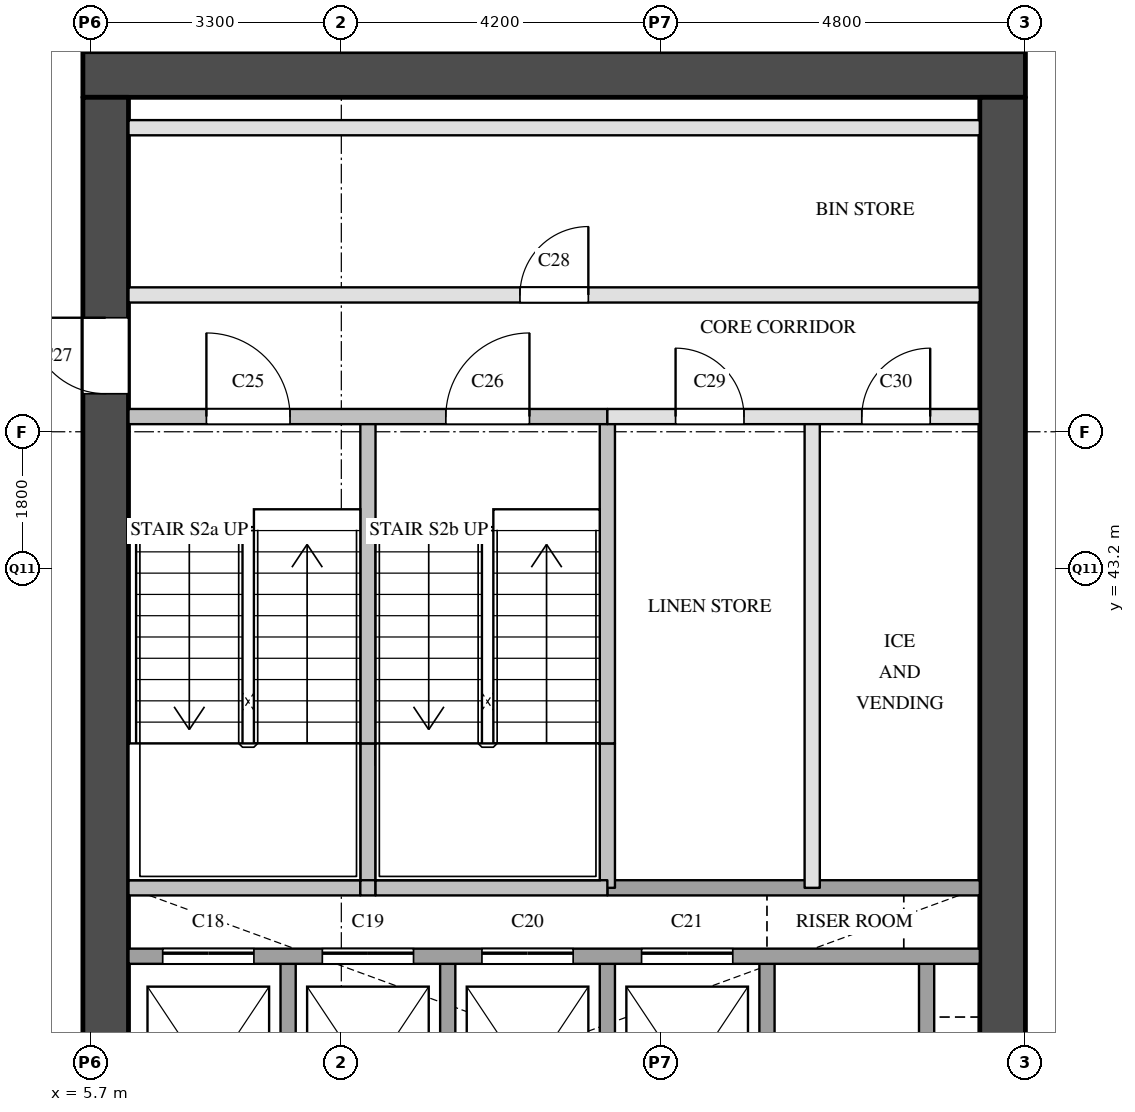
"""IFC4 building model, lengths in metres.
Left out: names, types, materials, properties, quantities, classifications, styles, units other than length and angle.
Written with IfcOpenShell. Run it as: python <this file> out.ifc"""

import sys

from ifc_helpers import new_model, si_unit, direction, frame, frame_2d, origin, place, context, subcontext, project, spatial, rectangle, extrude, element, fill, save


model = new_model("IFC4")
c1 = context("Model", 3, precision=1e-05, world=origin(), true_north=direction((0.0, 1.0)))
c2 = subcontext(c1, "Body", "Model", "MODEL_VIEW")
j1 = project(units=[si_unit("LENGTHUNIT", "METRE"), si_unit("PLANEANGLEUNIT", "RADIAN")], contexts=[c1])
p1 = place(None, origin())
s1 = spatial("IfcSite", under=j1, at=p1, CompositionType="ELEMENT")
p2 = place(p1, origin())
s2 = spatial("IfcBuilding", under=s1, at=p2, CompositionType="ELEMENT")
p3 = place(p2, frame((0.0, 0.0, 53.8)))
s3 = spatial("IfcBuildingStorey", under=s2, at=p3, CompositionType="ELEMENT", Elevation=53.8)
p4 = place(p3, frame((5.6, 49.7, 0.0), z_axis=(0.0, 0.0, 1.0), x_axis=(1.0, 0.0, 0.0)))
e1 = element("IfcWall", 1, at=p4, inside=s3, PredefinedType="SHEAR", context=c2, shape_type="SweptSolid", body=[
    extrude(rectangle(XDim=12.4, YDim=0.6, at=frame_2d((6.2, 0.0))), origin(), (0.0, 0.0, 1.0), 3.5),
])
p5 = place(p3, frame((5.9, 29.1, 0.0), z_axis=(0.0, 0.0, 1.0), x_axis=(0.0, 1.0, 0.0)))
e2 = element("IfcWall", 2, at=p5, inside=s3, PredefinedType="SHEAR", context=c2, shape_type="SweptSolid", body=[
    extrude(rectangle(XDim=20.3, YDim=0.6, at=frame_2d((10.15, 0.0))), origin(), (0.0, 0.0, 1.0), 3.5),
])
p6 = place(p5, frame((3.6, 0.0, 0.0)))
e3 = element("IfcOpeningElement", 3, at=p6, cuts=e2, PredefinedType="OPENING", context=c2, shape_type="SweptSolid", body=[
    extrude(rectangle(XDim=1.8, YDim=2.1, at=frame_2d((0.9, 1.05))), frame((0.0, 0.31, 0.0), z_axis=(0.0, -1.0, 0.0), x_axis=(1.0, 0.0, 0.0)), (0.0, 0.0, 1.0), 0.62),
])
p7 = place(p5, frame((16.4, 0.0, 0.0)))
e4 = element("IfcOpeningElement", 4, at=p7, cuts=e2, PredefinedType="OPENING", context=c2, shape_type="SweptSolid", body=[
    extrude(rectangle(XDim=1.0, YDim=2.1, at=frame_2d((0.5, 1.05))), frame((0.0, 0.31, 0.0), z_axis=(0.0, -1.0, 0.0), x_axis=(1.0, 0.0, 0.0)), (0.0, 0.0, 1.0), 0.62),
])
p8 = place(p3, frame((17.7, 29.1, 0.0), z_axis=(0.0, 0.0, 1.0), x_axis=(0.0, 1.0, 0.0)))
e5 = element("IfcWall", 5, at=p8, inside=s3, PredefinedType="SHEAR", context=c2, shape_type="SweptSolid", body=[
    extrude(rectangle(XDim=20.3, YDim=0.6, at=frame_2d((10.15, 0.0))), origin(), (0.0, 0.0, 1.0), 3.5),
])
p9 = place(p8, frame((1.25, 0.0, 0.0)))
e6 = element("IfcOpeningElement", 6, at=p9, cuts=e5, PredefinedType="OPENING", context=c2, shape_type="SweptSolid", body=[
    extrude(rectangle(XDim=0.7, YDim=2.1, at=frame_2d((0.35, 1.05))), frame((0.0, 0.31, 0.0), z_axis=(0.0, -1.0, 0.0), x_axis=(1.0, 0.0, 0.0)), (0.0, 0.0, 1.0), 0.62),
])
p10 = place(p8, frame((7.05, 0.0, 0.0)))
e7 = element("IfcOpeningElement", 7, at=p10, cuts=e5, PredefinedType="OPENING", context=c2, shape_type="SweptSolid", body=[
    extrude(rectangle(XDim=0.7, YDim=2.1, at=frame_2d((0.35, 1.05))), frame((0.0, 0.31, 0.0), z_axis=(0.0, -1.0, 0.0), x_axis=(1.0, 0.0, 0.0)), (0.0, 0.0, 1.0), 0.62),
])
p11 = place(p3, frame((8.3, 34.9, 0.0), z_axis=(0.0, 0.0, 1.0), x_axis=(0.0, 1.0, 0.0)))
e8 = element("IfcWall", 8, at=p11, inside=s3, PredefinedType="SOLIDWALL", context=c2, shape_type="SweptSolid", body=[
    extrude(rectangle(XDim=3.2, YDim=0.2, at=frame_2d((1.6, 0.0))), origin(), (0.0, 0.0, 1.0), 3.5),
])
p12 = place(p3, frame((9.35, 39.0, 0.0), z_axis=(0.0, 0.0, 1.0), x_axis=(0.0, 1.0, 0.0)))
e9 = element("IfcWall", 9, at=p12, inside=s3, PredefinedType="SOLIDWALL", context=c2, shape_type="SweptSolid", body=[
    extrude(rectangle(XDim=1.9, YDim=0.2, at=frame_2d((0.95, 0.0))), origin(), (0.0, 0.0, 1.0), 3.5),
])
p13 = place(p3, frame((9.35, 40.9, 0.0), z_axis=(0.0, 0.0, 1.0), x_axis=(0.0, 1.0, 0.0)))
e10 = element("IfcWall", 10, at=p13, inside=s3, PredefinedType="SOLIDWALL", context=c2, shape_type="SweptSolid", body=[
    extrude(rectangle(XDim=4.3, YDim=0.2, at=frame_2d((2.15, 0.0))), origin(), (0.0, 0.0, 1.0), 3.5),
])
for number, where, z_axis, x_axis in (
    (11, (10.4, 34.9, 0.0), (0.0, 0.0, 1.0), (0.0, 1.0, 0.0)),
    (12, (12.5, 34.9, 0.0), (0.0, 0.0, 1.0), (0.0, 1.0, 0.0)),
):
    element("IfcWall", number, at=place(p3, frame(where, z_axis=z_axis, x_axis=x_axis)), inside=s3, PredefinedType="SOLIDWALL", context=c2, shape_type="SweptSolid", body=[
        extrude(rectangle(XDim=3.2, YDim=0.2, at=frame_2d((1.6, 0.0))), origin(), (0.0, 0.0, 1.0), 3.5),
    ])
p14 = place(p3, frame((12.5, 39.0, 0.0), z_axis=(0.0, 0.0, 1.0), x_axis=(0.0, 1.0, 0.0)))
e13 = element("IfcWall", 13, at=p14, inside=s3, PredefinedType="SOLIDWALL", context=c2, shape_type="SweptSolid", body=[
    extrude(rectangle(XDim=1.9, YDim=0.2, at=frame_2d((0.95, 0.0))), origin(), (0.0, 0.0, 1.0), 3.5),
])
p15 = place(p3, frame((12.5, 40.9, 0.0), z_axis=(0.0, 0.0, 1.0), x_axis=(0.0, 1.0, 0.0)))
e14 = element("IfcWall", 14, at=p15, inside=s3, PredefinedType="SOLIDWALL", context=c2, shape_type="SweptSolid", body=[
    extrude(rectangle(XDim=4.3, YDim=0.2, at=frame_2d((2.15, 0.0))), origin(), (0.0, 0.0, 1.0), 3.5),
])
p16 = place(p3, frame((14.6, 34.9, 0.0), z_axis=(0.0, 0.0, 1.0), x_axis=(0.0, 1.0, 0.0)))
e15 = element("IfcWall", 15, at=p16, inside=s3, PredefinedType="SOLIDWALL", context=c2, shape_type="SweptSolid", body=[
    extrude(rectangle(XDim=3.2, YDim=0.2, at=frame_2d((1.6, 0.0))), origin(), (0.0, 0.0, 1.0), 3.5),
])
p17 = place(p3, frame((15.195, 39.0, 0.0), z_axis=(0.0, 0.0, 1.0), x_axis=(0.0, 1.0, 0.0)))
e16 = element("IfcWall", 16, at=p17, inside=s3, PredefinedType="PARTITIONING", context=c2, shape_type="SweptSolid", body=[
    extrude(rectangle(XDim=6.2, YDim=0.2, at=frame_2d((3.1, 0.0))), origin(), (0.0, 0.0, 1.0), 3.5),
])
p18 = place(p3, frame((16.7, 34.9, 0.0), z_axis=(0.0, 0.0, 1.0), x_axis=(0.0, 1.0, 0.0)))
e17 = element("IfcWall", 17, at=p18, inside=s3, PredefinedType="SOLIDWALL", context=c2, shape_type="SweptSolid", body=[
    extrude(rectangle(XDim=3.2, YDim=0.2, at=frame_2d((1.6, 0.0))), origin(), (0.0, 0.0, 1.0), 3.5),
])
p19 = place(p3, frame((6.2, 38.1, 0.0), z_axis=(0.0, 0.0, 1.0), x_axis=(1.0, 0.0, 0.0)))
e18 = element("IfcWall", 18, at=p19, inside=s3, PredefinedType="SOLIDWALL", context=c2, shape_type="SweptSolid", body=[
    extrude(rectangle(XDim=11.2, YDim=0.2, at=frame_2d((5.6, 0.0))), origin(), (0.0, 0.0, 1.0), 3.5),
])
p20 = place(p19, frame((0.45, 0.0, 0.0)))
e19 = element("IfcOpeningElement", 19, at=p20, cuts=e18, PredefinedType="OPENING", context=c2, shape_type="SweptSolid", body=[
    extrude(rectangle(XDim=1.2, YDim=2.1, at=frame_2d((0.6, 1.05))), frame((0.0, 0.11, 0.0), z_axis=(0.0, -1.0, 0.0), x_axis=(1.0, 0.0, 0.0)), (0.0, 0.0, 1.0), 0.22),
])
p21 = place(p19, frame((2.55, 0.0, 0.0)))
e20 = element("IfcOpeningElement", 20, at=p21, cuts=e18, PredefinedType="OPENING", context=c2, shape_type="SweptSolid", body=[
    extrude(rectangle(XDim=1.2, YDim=2.1, at=frame_2d((0.6, 1.05))), frame((0.0, 0.11, 0.0), z_axis=(0.0, -1.0, 0.0), x_axis=(1.0, 0.0, 0.0)), (0.0, 0.0, 1.0), 0.22),
])
p22 = place(p19, frame((4.65, 0.0, 0.0)))
e21 = element("IfcOpeningElement", 21, at=p22, cuts=e18, PredefinedType="OPENING", context=c2, shape_type="SweptSolid", body=[
    extrude(rectangle(XDim=1.2, YDim=2.1, at=frame_2d((0.6, 1.05))), frame((0.0, 0.11, 0.0), z_axis=(0.0, -1.0, 0.0), x_axis=(1.0, 0.0, 0.0)), (0.0, 0.0, 1.0), 0.22),
])
p23 = place(p19, frame((6.75, 0.0, 0.0)))
e22 = element("IfcOpeningElement", 22, at=p23, cuts=e18, PredefinedType="OPENING", context=c2, shape_type="SweptSolid", body=[
    extrude(rectangle(XDim=1.2, YDim=2.1, at=frame_2d((0.6, 1.05))), frame((0.0, 0.11, 0.0), z_axis=(0.0, -1.0, 0.0), x_axis=(1.0, 0.0, 0.0)), (0.0, 0.0, 1.0), 0.22),
])
p24 = place(p3, frame((12.5, 39.0, 0.0), z_axis=(0.0, 0.0, 1.0), x_axis=(1.0, 0.0, 0.0)))
e23 = element("IfcWall", 23, at=p24, inside=s3, PredefinedType="SOLIDWALL", context=c2, shape_type="SweptSolid", body=[
    extrude(rectangle(XDim=4.9, YDim=0.2, at=frame_2d((2.45, 0.0))), origin(), (0.0, 0.0, 1.0), 3.5),
])
p25 = place(p3, frame((6.2, 39.0, 0.0), z_axis=(0.0, 0.0, 1.0), x_axis=(1.0, 0.0, 0.0)))
e24 = element("IfcWall", 24, at=p25, inside=s3, PredefinedType="SOLIDWALL", context=c2, shape_type="SweptSolid", body=[
    extrude(rectangle(XDim=3.05, YDim=0.2, at=frame_2d((1.525, 0.0))), origin(), (0.0, 0.0, 1.0), 3.5),
])
p26 = place(p3, frame((9.25, 39.0, 0.0), z_axis=(0.0, 0.0, 1.0), x_axis=(1.0, 0.0, 0.0)))
e25 = element("IfcWall", 25, at=p26, inside=s3, PredefinedType="SOLIDWALL", context=c2, shape_type="SweptSolid", body=[
    extrude(rectangle(XDim=0.2, YDim=0.2, at=frame_2d((0.1, 0.0))), origin(), (0.0, 0.0, 1.0), 3.5),
])
p27 = place(p3, frame((9.45, 39.0, 0.0), z_axis=(0.0, 0.0, 1.0), x_axis=(1.0, 0.0, 0.0)))
e26 = element("IfcWall", 26, at=p27, inside=s3, PredefinedType="SOLIDWALL", context=c2, shape_type="SweptSolid", body=[
    extrude(rectangle(XDim=3.05, YDim=0.2, at=frame_2d((1.525, 0.0))), origin(), (0.0, 0.0, 1.0), 3.5),
])
p28 = place(p3, frame((12.5, 45.2, 0.0), z_axis=(0.0, 0.0, 1.0), x_axis=(1.0, 0.0, 0.0)))
e27 = element("IfcWall", 27, at=p28, inside=s3, PredefinedType="PARTITIONING", context=c2, shape_type="SweptSolid", body=[
    extrude(rectangle(XDim=4.9, YDim=0.2, at=frame_2d((2.45, 0.0))), origin(), (0.0, 0.0, 1.0), 3.5),
])
p29 = place(p28, frame((0.897, 0.0, 0.0)))
e28 = element("IfcOpeningElement", 28, at=p29, cuts=e27, PredefinedType="OPENING", context=c2, shape_type="SweptSolid", body=[
    extrude(rectangle(XDim=0.9, YDim=2.1, at=frame_2d((0.45, 1.05))), frame((0.0, 0.11, 0.0), z_axis=(0.0, -1.0, 0.0), x_axis=(1.0, 0.0, 0.0)), (0.0, 0.0, 1.0), 0.22),
])
p30 = place(p28, frame((3.347, 0.0, 0.0)))
e29 = element("IfcOpeningElement", 29, at=p30, cuts=e27, PredefinedType="OPENING", context=c2, shape_type="SweptSolid", body=[
    extrude(rectangle(XDim=0.9, YDim=2.1, at=frame_2d((0.45, 1.05))), frame((0.0, 0.11, 0.0), z_axis=(0.0, -1.0, 0.0), x_axis=(1.0, 0.0, 0.0)), (0.0, 0.0, 1.0), 0.22),
])
p31 = place(p3, frame((6.2, 45.2, 0.0), z_axis=(0.0, 0.0, 1.0), x_axis=(1.0, 0.0, 0.0)))
e30 = element("IfcWall", 30, at=p31, inside=s3, PredefinedType="SOLIDWALL", context=c2, shape_type="SweptSolid", body=[
    extrude(rectangle(XDim=6.3, YDim=0.2, at=frame_2d((3.15, 0.0))), origin(), (0.0, 0.0, 1.0), 3.5),
])
p32 = place(p31, frame((1.025, 0.0, 0.0)))
e31 = element("IfcOpeningElement", 31, at=p32, cuts=e30, PredefinedType="OPENING", context=c2, shape_type="SweptSolid", body=[
    extrude(rectangle(XDim=1.1, YDim=2.1, at=frame_2d((0.55, 1.05))), frame((0.0, 0.11, 0.0), z_axis=(0.0, -1.0, 0.0), x_axis=(1.0, 0.0, 0.0)), (0.0, 0.0, 1.0), 0.22),
])
p33 = place(p31, frame((4.175, 0.0, 0.0)))
e32 = element("IfcOpeningElement", 32, at=p33, cuts=e30, PredefinedType="OPENING", context=c2, shape_type="SweptSolid", body=[
    extrude(rectangle(XDim=1.1, YDim=2.1, at=frame_2d((0.55, 1.05))), frame((0.0, 0.11, 0.0), z_axis=(0.0, -1.0, 0.0), x_axis=(1.0, 0.0, 0.0)), (0.0, 0.0, 1.0), 0.22),
])
p34 = place(p3, frame((6.2, 46.8, 0.0), z_axis=(0.0, 0.0, 1.0), x_axis=(1.0, 0.0, 0.0)))
e33 = element("IfcWall", 33, at=p34, inside=s3, PredefinedType="PARTITIONING", context=c2, shape_type="SweptSolid", body=[
    extrude(rectangle(XDim=11.2, YDim=0.2, at=frame_2d((5.6, 0.0))), origin(), (0.0, 0.0, 1.0), 3.5),
])
p35 = place(p34, frame((5.15, 0.0, 0.0)))
e34 = element("IfcOpeningElement", 34, at=p35, cuts=e33, PredefinedType="OPENING", context=c2, shape_type="SweptSolid", body=[
    extrude(rectangle(XDim=0.9, YDim=2.1, at=frame_2d((0.45, 1.05))), frame((0.0, 0.11, 0.0), z_axis=(0.0, -1.0, 0.0), x_axis=(1.0, 0.0, 0.0)), (0.0, 0.0, 1.0), 0.22),
])
p36 = place(p3, frame((6.2, 49.0, 0.0), z_axis=(0.0, 0.0, 1.0), x_axis=(1.0, 0.0, 0.0)))
e35 = element("IfcWall", 35, at=p36, inside=s3, PredefinedType="PARTITIONING", context=c2, shape_type="SweptSolid", body=[
    extrude(rectangle(XDim=11.2, YDim=0.2, at=frame_2d((5.6, 0.0))), origin(), (0.0, 0.0, 1.0), 3.5),
])
p37 = place(p20, origin())
e36 = element("IfcDoor", 36, at=p37, inside=s3, OperationType="SLIDING_TO_LEFT", PredefinedType="DOOR", context=c2, shape_type="SweptSolid", body=[
    extrude(rectangle(XDim=1.2, YDim=2.1, at=frame_2d((0.6, 1.05))), frame((0.0, 0.025, 0.0), z_axis=(0.0, -1.0, 0.0), x_axis=(1.0, 0.0, 0.0)), (0.0, 0.0, 1.0), 0.05),
])
fill(e19, e36)
p38 = place(p21, origin())
e37 = element("IfcDoor", 37, at=p38, inside=s3, OperationType="SLIDING_TO_LEFT", PredefinedType="DOOR", context=c2, shape_type="SweptSolid", body=[
    extrude(rectangle(XDim=1.2, YDim=2.1, at=frame_2d((0.6, 1.05))), frame((0.0, 0.025, 0.0), z_axis=(0.0, -1.0, 0.0), x_axis=(1.0, 0.0, 0.0)), (0.0, 0.0, 1.0), 0.05),
])
fill(e20, e37)
p39 = place(p22, origin())
e38 = element("IfcDoor", 38, at=p39, inside=s3, OperationType="SLIDING_TO_LEFT", PredefinedType="DOOR", context=c2, shape_type="SweptSolid", body=[
    extrude(rectangle(XDim=1.2, YDim=2.1, at=frame_2d((0.6, 1.05))), frame((0.0, 0.025, 0.0), z_axis=(0.0, -1.0, 0.0), x_axis=(1.0, 0.0, 0.0)), (0.0, 0.0, 1.0), 0.05),
])
fill(e21, e38)
p40 = place(p23, origin())
e39 = element("IfcDoor", 39, at=p40, inside=s3, OperationType="SLIDING_TO_LEFT", PredefinedType="DOOR", context=c2, shape_type="SweptSolid", body=[
    extrude(rectangle(XDim=1.2, YDim=2.1, at=frame_2d((0.6, 1.05))), frame((0.0, 0.025, 0.0), z_axis=(0.0, -1.0, 0.0), x_axis=(1.0, 0.0, 0.0)), (0.0, 0.0, 1.0), 0.05),
])
fill(e22, e39)
p41 = place(p32, origin())
e40 = element("IfcDoor", 40, at=p41, inside=s3, OperationType="SINGLE_SWING_LEFT", PredefinedType="DOOR", context=c2, shape_type="SweptSolid", body=[
    extrude(rectangle(XDim=1.1, YDim=2.1, at=frame_2d((0.55, 1.05))), frame((0.0, 0.025, 0.0), z_axis=(0.0, -1.0, 0.0), x_axis=(1.0, 0.0, 0.0)), (0.0, 0.0, 1.0), 0.05),
])
fill(e31, e40)
p42 = place(p33, origin())
e41 = element("IfcDoor", 41, at=p42, inside=s3, OperationType="SINGLE_SWING_RIGHT", PredefinedType="DOOR", context=c2, shape_type="SweptSolid", body=[
    extrude(rectangle(XDim=1.1, YDim=2.1, at=frame_2d((0.55, 1.05))), frame((0.0, 0.025, 0.0), z_axis=(0.0, -1.0, 0.0), x_axis=(1.0, 0.0, 0.0)), (0.0, 0.0, 1.0), 0.05),
])
fill(e32, e41)
p43 = place(p7, origin())
e42 = element("IfcDoor", 42, at=p43, inside=s3, OperationType="SINGLE_SWING_RIGHT", PredefinedType="DOOR", context=c2, shape_type="SweptSolid", body=[
    extrude(rectangle(XDim=1.0, YDim=2.1, at=frame_2d((0.5, 1.05))), frame((0.0, 0.025, 0.0), z_axis=(0.0, -1.0, 0.0), x_axis=(1.0, 0.0, 0.0)), (0.0, 0.0, 1.0), 0.05),
])
fill(e4, e42)
p44 = place(p35, origin())
e43 = element("IfcDoor", 43, at=p44, inside=s3, OperationType="SINGLE_SWING_RIGHT", PredefinedType="DOOR", context=c2, shape_type="SweptSolid", body=[
    extrude(rectangle(XDim=0.9, YDim=2.1, at=frame_2d((0.45, 1.05))), frame((0.0, 0.025, 0.0), z_axis=(0.0, -1.0, 0.0), x_axis=(1.0, 0.0, 0.0)), (0.0, 0.0, 1.0), 0.05),
])
fill(e34, e43)
p45 = place(p29, origin())
e44 = element("IfcDoor", 44, at=p45, inside=s3, OperationType="SINGLE_SWING_LEFT", PredefinedType="DOOR", context=c2, shape_type="SweptSolid", body=[
    extrude(rectangle(XDim=0.9, YDim=2.1, at=frame_2d((0.45, 1.05))), frame((0.0, 0.025, 0.0), z_axis=(0.0, -1.0, 0.0), x_axis=(1.0, 0.0, 0.0)), (0.0, 0.0, 1.0), 0.05),
])
fill(e28, e44)
p46 = place(p30, origin())
e45 = element("IfcDoor", 45, at=p46, inside=s3, OperationType="SINGLE_SWING_RIGHT", PredefinedType="DOOR", context=c2, shape_type="SweptSolid", body=[
    extrude(rectangle(XDim=0.9, YDim=2.1, at=frame_2d((0.45, 1.05))), frame((0.0, 0.025, 0.0), z_axis=(0.0, -1.0, 0.0), x_axis=(1.0, 0.0, 0.0)), (0.0, 0.0, 1.0), 0.05),
])
fill(e29, e45)
save(model, sys.argv[1])
